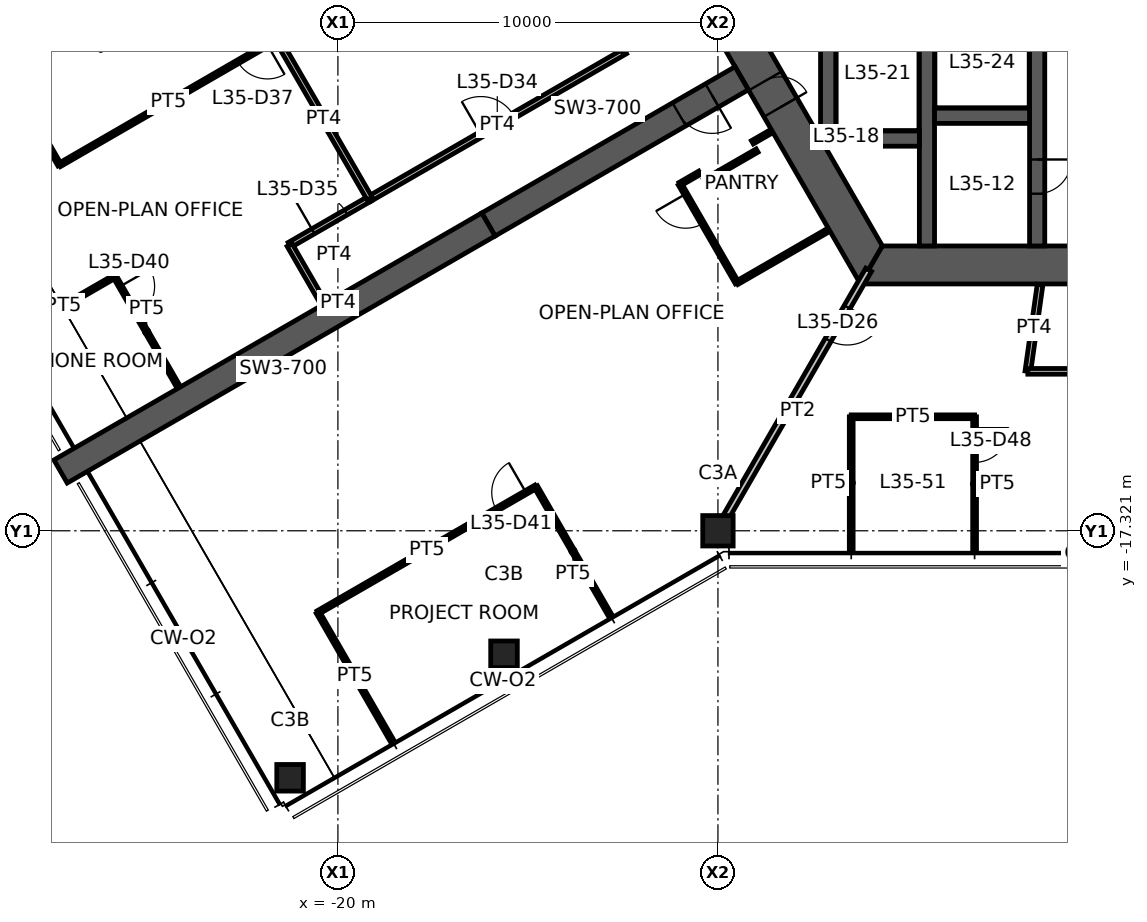
"""IFC4 building model, lengths in metres.
Left out: names, types, materials, properties, quantities, classifications, styles, units other than length and angle.
Written with IfcOpenShell. Run it as: python <this file> out.ifc"""

import sys

from ifc_helpers import new_model, si_unit, direction, frame, frame_2d, origin, origin_2d, place, context, subcontext, project, spatial, polyline, rectangle, hollow_rectangle, outline, extrude, element, fill, save


model = new_model("IFC4")
c1 = context("Model", 3, precision=1e-05, world=origin(), true_north=direction((0.0, 1.0)))
c2 = subcontext(c1, "Body", "Model", "MODEL_VIEW")
j1 = project(units=[si_unit("LENGTHUNIT", "METRE"), si_unit("PLANEANGLEUNIT", "RADIAN")], contexts=[c1])
p1 = place(None, origin())
s1 = spatial("IfcSite", under=j1, at=p1, CompositionType="ELEMENT")
p2 = place(p1, origin())
s2 = spatial("IfcBuilding", under=s1, at=p2, CompositionType="ELEMENT")
p3 = place(p2, frame((0.0, 0.0, 140.9)))
s3 = spatial("IfcBuildingStorey", under=s2, at=p3, CompositionType="ELEMENT", Elevation=140.9)
p4 = place(p3, frame((-10.0, -17.321, 0.0), z_axis=(0.0, 0.0, 1.0), x_axis=(1.0, 0.0, 0.0)))
e1 = element("IfcColumn", 1, at=p4, inside=s3, PredefinedType="COLUMN", context=c2, shape_type="SweptSolid", body=[
    extrude(hollow_rectangle(XDim=0.8, YDim=0.8, WallThickness=0.045, at=origin_2d()), origin(), (0.0, 0.0, 1.0), 3.9),
])
for number, where, z_axis, x_axis in (
    (2, (-15.629, -20.571, 0.0), (0.0, 0.0, 1.0), (1.0, 0.0, 0.0)),
    (3, (-21.258, -23.821, 0.0), (0.0, 0.0, 1.0), (1.0, 0.0, 0.0)),
):
    element("IfcColumn", number, at=place(p3, frame(where, z_axis=z_axis, x_axis=x_axis)), inside=s3, PredefinedType="COLUMN", context=c2, shape_type="SweptSolid", body=[
        extrude(hollow_rectangle(XDim=0.7, YDim=0.7, WallThickness=0.036, at=origin_2d()), origin(), (0.0, 0.0, 1.0), 3.9),
    ])
p5 = place(p3, frame((-11.922, 0.0, 0.0), z_axis=(0.0, 0.0, 1.0), x_axis=(0.500004296715, -0.866022923061, 0.0)))
e4 = element("IfcWall", 4, at=p5, inside=s3, PredefinedType="SHEAR", context=c2, shape_type="SweptSolid", body=[
    extrude(outline(polyline([(-0.289, -0.5), (6.331, -0.5), (7.131, -0.5), (12.211, -0.5), (11.634, 0.5), (7.131, 0.5), (6.331, 0.5), (0.289, 0.5), (-0.289, -0.5)])), origin(), (0.0, 0.0, 1.0), 3.9),
])
p6 = place(p5, frame((6.331, 0.0, 0.0)))
e5 = element("IfcOpeningElement", 5, at=p6, cuts=e4, PredefinedType="OPENING", context=c2, shape_type="SweptSolid", body=[
    extrude(rectangle(XDim=0.8, YDim=2.1, at=frame_2d((0.4, 1.05))), frame((0.0, 0.51, 0.0), z_axis=(0.0, -1.0, 0.0), x_axis=(1.0, 0.0, 0.0)), (0.0, 0.0, 1.0), 1.02),
])
p7 = place(p3, frame((-5.961, -10.325, 0.0), z_axis=(0.0, 0.0, 1.0), x_axis=(1.0, 0.0, 0.0)))
e6 = element("IfcWall", 6, at=p7, inside=s3, PredefinedType="SHEAR", context=c2, shape_type="SweptSolid", body=[
    extrude(outline(polyline([(-0.289, -0.5), (5.461, -0.5), (6.461, -0.5), (12.211, -0.5), (11.634, 0.5), (6.461, 0.5), (5.461, 0.5), (0.289, 0.5), (-0.289, -0.5)])), origin(), (0.0, 0.0, 1.0), 3.9),
])
p8 = place(p7, frame((5.461, 0.0, 0.0)))
e7 = element("IfcOpeningElement", 7, at=p8, cuts=e6, PredefinedType="OPENING", context=c2, shape_type="SweptSolid", body=[
    extrude(rectangle(XDim=1.0, YDim=2.1, at=frame_2d((0.5, 1.05))), frame((0.0, 0.51, 0.0), z_axis=(0.0, -1.0, 0.0), x_axis=(1.0, 0.0, 0.0)), (0.0, 0.0, 1.0), 1.02),
])
p9 = place(p3, frame((-9.375, -5.413, 0.0), z_axis=(0.0, 0.0, 1.0), x_axis=(-0.866032377459, -0.499987921047, 0.0)))
e8 = element("IfcWall", 8, at=p9, inside=s3, PredefinedType="SHEAR", context=c2, shape_type="SweptSolid", body=[
    extrude(rectangle(XDim=7.696, YDim=0.7, at=frame_2d((3.848, 0.0))), origin(), (0.0, 0.0, 1.0), 3.9),
])
p10 = place(p9, frame((0.9, 0.0, 0.0)))
e9 = element("IfcOpeningElement", 9, at=p10, cuts=e8, PredefinedType="OPENING", context=c2, shape_type="SweptSolid", body=[
    extrude(rectangle(XDim=1.0, YDim=2.1, at=frame_2d((0.5, 1.05))), frame((0.0, 0.36, 0.0), z_axis=(0.0, -1.0, 0.0), x_axis=(1.0, 0.0, 0.0)), (0.0, 0.0, 1.0), 0.72),
])
p11 = place(p3, frame((-16.039, -9.26, 0.0), z_axis=(0.0, 0.0, 1.0), x_axis=(-0.866024837091, -0.50000098154, 0.0)))
e10 = element("IfcWall", 10, at=p11, inside=s3, PredefinedType="SHEAR", context=c2, shape_type="SweptSolid", body=[
    extrude(rectangle(XDim=13.0, YDim=0.7, at=frame_2d((6.5, 0.0))), origin(), (0.0, 0.0, 1.0), 3.9),
])
p12 = place(p3, frame((-1.6, -3.8, 0.0), z_axis=(0.0, 0.0, 1.0), x_axis=(0.0, -1.0, 0.0)))
e11 = element("IfcWall", 11, at=p12, inside=s3, PredefinedType="SHEAR", context=c2, shape_type="SweptSolid", body=[
    extrude(rectangle(XDim=6.025, YDim=0.4, at=frame_2d((3.012, 0.0))), origin(), (0.0, 0.0, 1.0), 3.9),
])
p13 = place(p12, frame((3.75, 0.0, 0.0)))
e12 = element("IfcOpeningElement", 12, at=p13, cuts=e11, PredefinedType="OPENING", context=c2, shape_type="SweptSolid", body=[
    extrude(rectangle(XDim=0.9, YDim=2.1, at=frame_2d((0.45, 1.05))), frame((0.0, 0.21, 0.0), z_axis=(0.0, -1.0, 0.0), x_axis=(1.0, 0.0, 0.0)), (0.0, 0.0, 1.0), 0.42),
])
p14 = place(p3, frame((-4.5, -3.8, 0.0), z_axis=(0.0, 0.0, 1.0), x_axis=(0.0, -1.0, 0.0)))
e13 = element("IfcWall", 13, at=p14, inside=s3, PredefinedType="SHEAR", context=c2, shape_type="SweptSolid", body=[
    extrude(rectangle(XDim=6.025, YDim=0.4, at=frame_2d((3.012, 0.0))), origin(), (0.0, 0.0, 1.0), 3.9),
])
p15 = place(p3, frame((-4.3, -6.4, 0.0), z_axis=(0.0, 0.0, 1.0), x_axis=(1.0, 0.0, 0.0)))
e14 = element("IfcWall", 14, at=p15, inside=s3, PredefinedType="SHEAR", context=c2, shape_type="SweptSolid", body=[
    extrude(rectangle(XDim=2.5, YDim=0.4, at=frame_2d((1.25, 0.0))), origin(), (0.0, 0.0, 1.0), 3.9),
])
p16 = place(p3, frame((-6.9, -7.0, 0.0), z_axis=(0.0, 0.0, 1.0), x_axis=(1.0, 0.0, 0.0)))
e15 = element("IfcWall", 15, at=p16, inside=s3, PredefinedType="SHEAR", context=c2, shape_type="SweptSolid", body=[
    extrude(rectangle(XDim=2.2, YDim=0.4, at=frame_2d((1.1, 0.0))), origin(), (0.0, 0.0, 1.0), 3.9),
])
p17 = place(p3, frame((-7.1, -3.8, 0.0), z_axis=(0.0, 0.0, 1.0), x_axis=(0.0, -1.0, 0.0)))
e16 = element("IfcWall", 16, at=p17, inside=s3, PredefinedType="SHEAR", context=c2, shape_type="SweptSolid", body=[
    extrude(outline(polyline([(0.0, -0.2), (3.206, -0.2), (3.4, 0.0), (3.4, 0.2), (0.0, 0.2), (0.0, -0.2)])), origin(), (0.0, 0.0, 1.0), 3.9),
])
p18 = place(p3, frame((-6.035, -10.453, 0.0), z_axis=(0.0, 0.0, 1.0), x_axis=(-0.499989830942, -0.866031274813, 0.0)))
e17 = element("IfcWall", 17, at=p18, inside=s3, PredefinedType="PARTITIONING", context=c2, shape_type="SweptSolid", body=[
    extrude(rectangle(XDim=7.93, YDim=0.175, at=frame_2d((3.965, 0.0))), origin(), (0.0, 0.0, 1.0), 3.05),
])
p19 = place(p18, frame((1.13, 0.0, 0.0)))
e18 = element("IfcOpeningElement", 18, at=p19, cuts=e17, PredefinedType="OPENING", context=c2, shape_type="SweptSolid", body=[
    extrude(rectangle(XDim=1.0, YDim=2.1, at=frame_2d((0.5, 1.05))), frame((0.0, 0.098, 0.0), z_axis=(0.0, -1.0, 0.0), x_axis=(1.0, 0.0, 0.0)), (0.0, 0.0, 1.0), 0.195),
])
p20 = place(p3, frame((-19.171, -8.586, 0.0), z_axis=(0.0, 0.0, 1.0), x_axis=(0.866007176269, 0.500031569654, 0.0)))
e19 = element("IfcWall", 19, at=p20, inside=s3, PredefinedType="PARTITIONING", context=c2, shape_type="SweptSolid", body=[
    extrude(rectangle(XDim=7.771, YDim=0.15, at=frame_2d((3.885, 0.0))), origin(), (0.0, 0.0, 1.0), 2.95),
])
p21 = place(p20, frame((3.385, 0.0, 0.0)))
e20 = element("IfcOpeningElement", 20, at=p21, cuts=e19, PredefinedType="OPENING", context=c2, shape_type="SweptSolid", body=[
    extrude(rectangle(XDim=1.0, YDim=2.1, at=frame_2d((0.5, 1.05))), frame((0.0, 0.085, 0.0), z_axis=(0.0, -1.0, 0.0), x_axis=(1.0, 0.0, 0.0)), (0.0, 0.0, 1.0), 0.17),
])
p22 = place(p3, frame((-12.442, -4.7, 0.0), z_axis=(0.0, 0.0, 1.0), x_axis=(-0.500009286329, 0.866020042254, 0.0)))
e21 = element("IfcWall", 21, at=p22, inside=s3, PredefinedType="PARTITIONING", context=c2, shape_type="SweptSolid", body=[
    extrude(rectangle(XDim=5.428, YDim=0.15, at=frame_2d((2.714, 0.0))), origin(), (0.0, 0.0, 1.0), 2.95),
])
p23 = place(p3, frame((-21.271, -9.798, 0.0), z_axis=(0.0, 0.0, 1.0), x_axis=(0.866025270247, 0.500000231294, 0.0)))
e22 = element("IfcWall", 22, at=p23, inside=s3, PredefinedType="PARTITIONING", context=c2, shape_type="SweptSolid", body=[
    extrude(rectangle(XDim=2.435, YDim=0.15, at=frame_2d((1.217, 0.0))), origin(), (0.0, 0.0, 1.0), 2.95),
])
p24 = place(p23, frame((0.717, 0.0, 0.0)))
e23 = element("IfcOpeningElement", 23, at=p24, cuts=e22, PredefinedType="OPENING", context=c2, shape_type="SweptSolid", body=[
    extrude(rectangle(XDim=1.0, YDim=2.1, at=frame_2d((0.5, 1.05))), frame((0.0, 0.085, 0.0), z_axis=(0.0, -1.0, 0.0), x_axis=(1.0, 0.0, 0.0)), (0.0, 0.0, 1.0), 0.17),
])
p25 = place(p3, frame((-20.381, -11.34, 0.0), z_axis=(0.0, 0.0, 1.0), x_axis=(-0.500062787734, 0.865989150234, 0.0)))
e24 = element("IfcWall", 24, at=p25, inside=s3, PredefinedType="PARTITIONING", context=c2, shape_type="SweptSolid", body=[
    extrude(rectangle(XDim=1.78, YDim=0.15, at=frame_2d((0.89, 0.0))), origin(), (0.0, 0.0, 1.0), 2.95),
])
p26 = place(p3, frame((-27.325, -7.693, 0.0), z_axis=(0.0, 0.0, 1.0), x_axis=(-0.499989765943, 0.866031312339, 0.0)))
e25 = element("IfcWall", 25, at=p26, inside=s3, PredefinedType="PARTITIONING", context=c2, shape_type="SweptSolid", body=[
    extrude(rectangle(XDim=3.505, YDim=0.1, at=frame_2d((1.752, 0.0))), origin(), (0.0, 0.0, 1.0), 2.95),
])
p27 = place(p3, frame((-21.594, -4.379, 0.0), z_axis=(0.0, 0.0, 1.0), x_axis=(-0.865682888643, -0.500592784916, 0.0)))
e26 = element("IfcWall", 26, at=p27, inside=s3, PredefinedType="PARTITIONING", context=c2, shape_type="SweptSolid", body=[
    extrude(rectangle(XDim=6.62, YDim=0.1, at=frame_2d((3.31, 0.0))), origin(), (0.0, 0.0, 1.0), 2.95),
])
p28 = place(p27, frame((0.3, 0.0, 0.0)))
e27 = element("IfcOpeningElement", 27, at=p28, cuts=e26, PredefinedType="OPENING", context=c2, shape_type="SweptSolid", body=[
    extrude(rectangle(XDim=0.9, YDim=2.1, at=frame_2d((0.45, 1.05))), frame((0.0, 0.06, 0.0), z_axis=(0.0, -1.0, 0.0), x_axis=(1.0, 0.0, 0.0)), (0.0, 0.0, 1.0), 0.12),
])
p29 = place(p3, frame((-28.562, -12.18, 0.0), z_axis=(0.0, 0.0, 1.0), x_axis=(0.866042875753, 0.499969736442, 0.0)))
e28 = element("IfcWall", 28, at=p29, inside=s3, PredefinedType="PARTITIONING", context=c2, shape_type="SweptSolid", body=[
    extrude(rectangle(XDim=3.105, YDim=0.1, at=frame_2d((1.553, 0.0))), origin(), (0.0, 0.0, 1.0), 2.95),
])
p30 = place(p3, frame((-25.873, -10.627, 0.0), z_axis=(0.0, 0.0, 1.0), x_axis=(0.5000115033, -0.866018762249, 0.0)))
e29 = element("IfcWall", 29, at=p30, inside=s3, PredefinedType="PARTITIONING", context=c2, shape_type="SweptSolid", body=[
    extrude(rectangle(XDim=3.363, YDim=0.1, at=frame_2d((1.682, 0.0))), origin(), (0.0, 0.0, 1.0), 2.95),
])
p31 = place(p30, frame((0.3, 0.0, 0.0)))
e30 = element("IfcOpeningElement", 30, at=p31, cuts=e29, PredefinedType="OPENING", context=c2, shape_type="SweptSolid", body=[
    extrude(rectangle(XDim=0.9, YDim=2.1, at=frame_2d((0.45, 1.05))), frame((0.0, 0.06, 0.0), z_axis=(0.0, -1.0, 0.0), x_axis=(1.0, 0.0, 0.0)), (0.0, 0.0, 1.0), 0.12),
])
p32 = place(p3, frame((-19.163, -8.581, 0.0), z_axis=(0.0, 0.0, 1.0), x_axis=(-0.500843945189, 0.865537603209, 0.0)))
e31 = element("IfcWall", 31, at=p32, inside=s3, PredefinedType="PARTITIONING", context=c2, shape_type="SweptSolid", body=[
    extrude(rectangle(XDim=4.854, YDim=0.15, at=frame_2d((2.427, 0.0))), origin(), (0.0, 0.0, 1.0), 2.95),
])
p33 = place(p3, frame((-20.525, -19.471, 0.0), z_axis=(0.0, 0.0, 1.0), x_axis=(0.866021597574, 0.500006592492, 0.0)))
e32 = element("IfcWall", 32, at=p33, inside=s3, PredefinedType="PARTITIONING", context=c2, shape_type="SweptSolid", body=[
    extrude(rectangle(XDim=6.62, YDim=0.1, at=frame_2d((3.31, 0.0))), origin(), (0.0, 0.0, 1.0), 2.95),
])
p34 = place(p33, frame((5.42, 0.0, 0.0)))
e33 = element("IfcOpeningElement", 33, at=p34, cuts=e32, PredefinedType="OPENING", context=c2, shape_type="SweptSolid", body=[
    extrude(rectangle(XDim=0.9, YDim=2.1, at=frame_2d((0.45, 1.05))), frame((0.0, 0.06, 0.0), z_axis=(0.0, -1.0, 0.0), x_axis=(1.0, 0.0, 0.0)), (0.0, 0.0, 1.0), 0.12),
])
p35 = place(p3, frame((-18.585, -22.831, 0.0), z_axis=(0.0, 0.0, 1.0), x_axis=(-0.499996613652, 0.866027358884, 0.0)))
e34 = element("IfcWall", 34, at=p35, inside=s3, PredefinedType="PARTITIONING", context=c2, shape_type="SweptSolid", body=[
    extrude(rectangle(XDim=3.88, YDim=0.1, at=frame_2d((1.94, 0.0))), origin(), (0.0, 0.0, 1.0), 2.95),
])
p36 = place(p3, frame((-14.792, -16.161, 0.0), z_axis=(0.0, 0.0, 1.0), x_axis=(0.500025510799, -0.866010674617, 0.0)))
e35 = element("IfcWall", 35, at=p36, inside=s3, PredefinedType="PARTITIONING", context=c2, shape_type="SweptSolid", body=[
    extrude(rectangle(XDim=3.905, YDim=0.1, at=frame_2d((1.953, 0.0))), origin(), (0.0, 0.0, 1.0), 2.95),
])
p37 = place(p3, frame((-11.0, -8.198, 0.0), z_axis=(0.0, 0.0, 1.0), x_axis=(0.866131372301, 0.499816412211, 0.0)))
e36 = element("IfcWall", 36, at=p37, inside=s3, PredefinedType="PARTITIONING", context=c2, shape_type="SweptSolid", body=[
    extrude(rectangle(XDim=0.6, YDim=0.1, at=frame_2d((0.3, 0.0))), origin(), (0.0, 0.0, 1.0), 2.95),
])
p38 = place(p3, frame((-10.355, -8.115, 0.0), z_axis=(0.0, 0.0, 1.0), x_axis=(0.866094119867, 0.499880961361, 0.0)))
e37 = element("IfcWall", 37, at=p38, inside=s3, PredefinedType="PARTITIONING", context=c2, shape_type="SweptSolid", body=[
    extrude(rectangle(XDim=1.6, YDim=0.1, at=frame_2d((0.8, 0.0))), origin(), (0.0, 0.0, 1.0), 2.95),
])
p39 = place(p3, frame((-9.5, -10.796, 0.0), z_axis=(0.0, 0.0, 1.0), x_axis=(-0.499990139034, 0.866031096941, 0.0)))
e38 = element("IfcWall", 38, at=p39, inside=s3, PredefinedType="PARTITIONING", context=c2, shape_type="SweptSolid", body=[
    extrude(rectangle(XDim=3.0, YDim=0.1, at=frame_2d((1.5, 0.0))), origin(), (0.0, 0.0, 1.0), 2.95),
])
p40 = place(p39, frame((1.8, 0.0, 0.0)))
e39 = element("IfcOpeningElement", 39, at=p40, cuts=e38, PredefinedType="OPENING", context=c2, shape_type="SweptSolid", body=[
    extrude(rectangle(XDim=0.9, YDim=2.1, at=frame_2d((0.45, 1.05))), frame((0.0, 0.06, 0.0), z_axis=(0.0, -1.0, 0.0), x_axis=(1.0, 0.0, 0.0)), (0.0, 0.0, 1.0), 0.12),
])
p41 = place(p3, frame((-9.094, -7.098, 0.0), z_axis=(0.0, 0.0, 1.0), x_axis=(0.865954211699, 0.50012328804, 0.0)))
e40 = element("IfcWall", 40, at=p41, inside=s3, PredefinedType="PARTITIONING", context=c2, shape_type="SweptSolid", body=[
    extrude(rectangle(XDim=0.58, YDim=0.1, at=frame_2d((0.29, 0.0))), origin(), (0.0, 0.0, 1.0), 2.95),
])
p42 = place(p3, frame((-7.092, -9.406, 0.0), z_axis=(0.0, 0.0, 1.0), x_axis=(-0.86603494908, -0.499983466698, 0.0)))
e41 = element("IfcWall", 41, at=p42, inside=s3, PredefinedType="PARTITIONING", context=c2, shape_type="SweptSolid", body=[
    extrude(rectangle(XDim=2.78, YDim=0.1, at=frame_2d((1.39, 0.0))), origin(), (0.0, 0.0, 1.0), 2.95),
])
p43 = place(p3, frame((-1.844, -13.125, 0.0), z_axis=(0.0, 0.0, 1.0), x_axis=(0.139119980631, 0.990275532864, 0.0)))
e42 = element("IfcWall", 42, at=p43, inside=s3, PredefinedType="PARTITIONING", context=c2, shape_type="SweptSolid", body=[
    extrude(rectangle(XDim=2.302, YDim=0.15, at=frame_2d((1.151, 0.0))), origin(), (0.0, 0.0, 1.0), 2.95),
])
p44 = place(p3, frame((7.578, -13.125, 0.0), z_axis=(0.0, 0.0, 1.0), x_axis=(-1.0, 0.0, 0.0)))
e43 = element("IfcWall", 43, at=p44, inside=s3, PredefinedType="PARTITIONING", context=c2, shape_type="SweptSolid", body=[
    extrude(rectangle(XDim=9.422, YDim=0.15, at=frame_2d((4.711, 0.0))), origin(), (0.0, 0.0, 1.0), 2.95),
])
p45 = place(p44, frame((4.211, 0.0, 0.0)))
e44 = element("IfcOpeningElement", 44, at=p45, cuts=e43, PredefinedType="OPENING", context=c2, shape_type="SweptSolid", body=[
    extrude(rectangle(XDim=1.0, YDim=2.1, at=frame_2d((0.5, 1.05))), frame((0.0, 0.085, 0.0), z_axis=(0.0, -1.0, 0.0), x_axis=(1.0, 0.0, 0.0)), (0.0, 0.0, 1.0), 0.17),
])
p46 = place(p3, frame((-6.493, -17.801, 0.0), z_axis=(0.0, 0.0, 1.0), x_axis=(0.0, 1.0, 0.0)))
e45 = element("IfcWall", 45, at=p46, inside=s3, PredefinedType="PARTITIONING", context=c2, shape_type="SweptSolid", body=[
    extrude(rectangle(XDim=3.48, YDim=0.1, at=frame_2d((1.74, 0.0))), origin(), (0.0, 0.0, 1.0), 2.95),
])
p47 = place(p3, frame((-6.493, -14.321, 0.0), z_axis=(0.0, 0.0, 1.0), x_axis=(1.0, 0.0, 0.0)))
e46 = element("IfcWall", 46, at=p47, inside=s3, PredefinedType="PARTITIONING", context=c2, shape_type="SweptSolid", body=[
    extrude(rectangle(XDim=3.247, YDim=0.1, at=frame_2d((1.623, 0.0))), origin(), (0.0, 0.0, 1.0), 2.95),
])
p48 = place(p3, frame((-3.246, -14.321, 0.0), z_axis=(0.0, 0.0, 1.0), x_axis=(0.0, -1.0, 0.0)))
e47 = element("IfcWall", 47, at=p48, inside=s3, PredefinedType="PARTITIONING", context=c2, shape_type="SweptSolid", body=[
    extrude(rectangle(XDim=3.53, YDim=0.1, at=frame_2d((1.765, 0.0))), origin(), (0.0, 0.0, 1.0), 2.95),
])
p49 = place(p48, frame((0.3, 0.0, 0.0)))
e48 = element("IfcOpeningElement", 48, at=p49, cuts=e47, PredefinedType="OPENING", context=c2, shape_type="SweptSolid", body=[
    extrude(rectangle(XDim=0.9, YDim=2.1, at=frame_2d((0.45, 1.05))), frame((0.0, 0.06, 0.0), z_axis=(0.0, -1.0, 0.0), x_axis=(1.0, 0.0, 0.0)), (0.0, 0.0, 1.0), 0.12),
])
p50 = place(p6, origin())
e49 = element("IfcDoor", 49, at=p50, inside=s3, OperationType="SINGLE_SWING_RIGHT", PredefinedType="DOOR", context=c2, shape_type="SweptSolid", body=[
    extrude(rectangle(XDim=0.8, YDim=2.1, at=frame_2d((0.4, 1.05))), frame((0.0, 0.025, 0.0), z_axis=(0.0, -1.0, 0.0), x_axis=(1.0, 0.0, 0.0)), (0.0, 0.0, 1.0), 0.05),
])
fill(e5, e49)
p51 = place(p13, origin())
e50 = element("IfcDoor", 50, at=p51, inside=s3, OperationType="SINGLE_SWING_LEFT", PredefinedType="DOOR", context=c2, shape_type="SweptSolid", body=[
    extrude(rectangle(XDim=0.9, YDim=2.1, at=frame_2d((0.45, 1.05))), frame((0.0, 0.025, 0.0), z_axis=(0.0, -1.0, 0.0), x_axis=(1.0, 0.0, 0.0)), (0.0, 0.0, 1.0), 0.05),
])
fill(e12, e50)
p52 = place(p10, origin())
e51 = element("IfcDoor", 51, at=p52, inside=s3, OperationType="SINGLE_SWING_LEFT", PredefinedType="DOOR", context=c2, shape_type="SweptSolid", body=[
    extrude(rectangle(XDim=1.0, YDim=2.1, at=frame_2d((0.5, 1.05))), frame((0.0, 0.025, 0.0), z_axis=(0.0, -1.0, 0.0), x_axis=(1.0, 0.0, 0.0)), (0.0, 0.0, 1.0), 0.05),
])
fill(e9, e51)
p53 = place(p19, origin())
e52 = element("IfcDoor", 52, at=p53, inside=s3, OperationType="SINGLE_SWING_LEFT", PredefinedType="DOOR", context=c2, shape_type="SweptSolid", body=[
    extrude(rectangle(XDim=1.0, YDim=2.1, at=frame_2d((0.5, 1.05))), frame((0.0, 0.025, 0.0), z_axis=(0.0, -1.0, 0.0), x_axis=(1.0, 0.0, 0.0)), (0.0, 0.0, 1.0), 0.05),
])
fill(e18, e52)
p54 = place(p21, origin())
e53 = element("IfcDoor", 53, at=p54, inside=s3, OperationType="SINGLE_SWING_LEFT", PredefinedType="DOOR", context=c2, shape_type="SweptSolid", body=[
    extrude(rectangle(XDim=1.0, YDim=2.1, at=frame_2d((0.5, 1.05))), frame((0.0, 0.025, 0.0), z_axis=(0.0, -1.0, 0.0), x_axis=(1.0, 0.0, 0.0)), (0.0, 0.0, 1.0), 0.05),
])
fill(e20, e53)
p55 = place(p24, origin())
e54 = element("IfcDoor", 54, at=p55, inside=s3, OperationType="SINGLE_SWING_LEFT", PredefinedType="DOOR", context=c2, shape_type="SweptSolid", body=[
    extrude(rectangle(XDim=1.0, YDim=2.1, at=frame_2d((0.5, 1.05))), frame((0.0, 0.025, 0.0), z_axis=(0.0, -1.0, 0.0), x_axis=(1.0, 0.0, 0.0)), (0.0, 0.0, 1.0), 0.05),
])
fill(e23, e54)
p56 = place(p28, origin())
e55 = element("IfcDoor", 55, at=p56, inside=s3, OperationType="SINGLE_SWING_LEFT", PredefinedType="DOOR", context=c2, shape_type="SweptSolid", body=[
    extrude(rectangle(XDim=0.9, YDim=2.1, at=frame_2d((0.45, 1.05))), frame((0.0, 0.025, 0.0), z_axis=(0.0, -1.0, 0.0), x_axis=(1.0, 0.0, 0.0)), (0.0, 0.0, 1.0), 0.05),
])
fill(e27, e55)
p57 = place(p31, origin())
e56 = element("IfcDoor", 56, at=p57, inside=s3, OperationType="SINGLE_SWING_LEFT", PredefinedType="DOOR", context=c2, shape_type="SweptSolid", body=[
    extrude(rectangle(XDim=0.9, YDim=2.1, at=frame_2d((0.45, 1.05))), frame((0.0, 0.025, 0.0), z_axis=(0.0, -1.0, 0.0), x_axis=(1.0, 0.0, 0.0)), (0.0, 0.0, 1.0), 0.05),
])
fill(e30, e56)
p58 = place(p34, origin())
e57 = element("IfcDoor", 57, at=p58, inside=s3, OperationType="SINGLE_SWING_RIGHT", PredefinedType="DOOR", context=c2, shape_type="SweptSolid", body=[
    extrude(rectangle(XDim=0.9, YDim=2.1, at=frame_2d((0.45, 1.05))), frame((0.0, 0.025, 0.0), z_axis=(0.0, -1.0, 0.0), x_axis=(1.0, 0.0, 0.0)), (0.0, 0.0, 1.0), 0.05),
])
fill(e33, e57)
p59 = place(p40, origin())
e58 = element("IfcDoor", 58, at=p59, inside=s3, OperationType="SINGLE_SWING_RIGHT", PredefinedType="DOOR", context=c2, shape_type="SweptSolid", body=[
    extrude(rectangle(XDim=0.9, YDim=2.1, at=frame_2d((0.45, 1.05))), frame((0.0, 0.025, 0.0), z_axis=(0.0, -1.0, 0.0), x_axis=(1.0, 0.0, 0.0)), (0.0, 0.0, 1.0), 0.05),
])
fill(e39, e58)
p60 = place(p49, origin())
e59 = element("IfcDoor", 59, at=p60, inside=s3, OperationType="SINGLE_SWING_LEFT", PredefinedType="DOOR", context=c2, shape_type="SweptSolid", body=[
    extrude(rectangle(XDim=0.9, YDim=2.1, at=frame_2d((0.45, 1.05))), frame((0.0, 0.025, 0.0), z_axis=(0.0, -1.0, 0.0), x_axis=(1.0, 0.0, 0.0)), (0.0, 0.0, 1.0), 0.05),
])
fill(e48, e59)
save(model, sys.argv[1])
